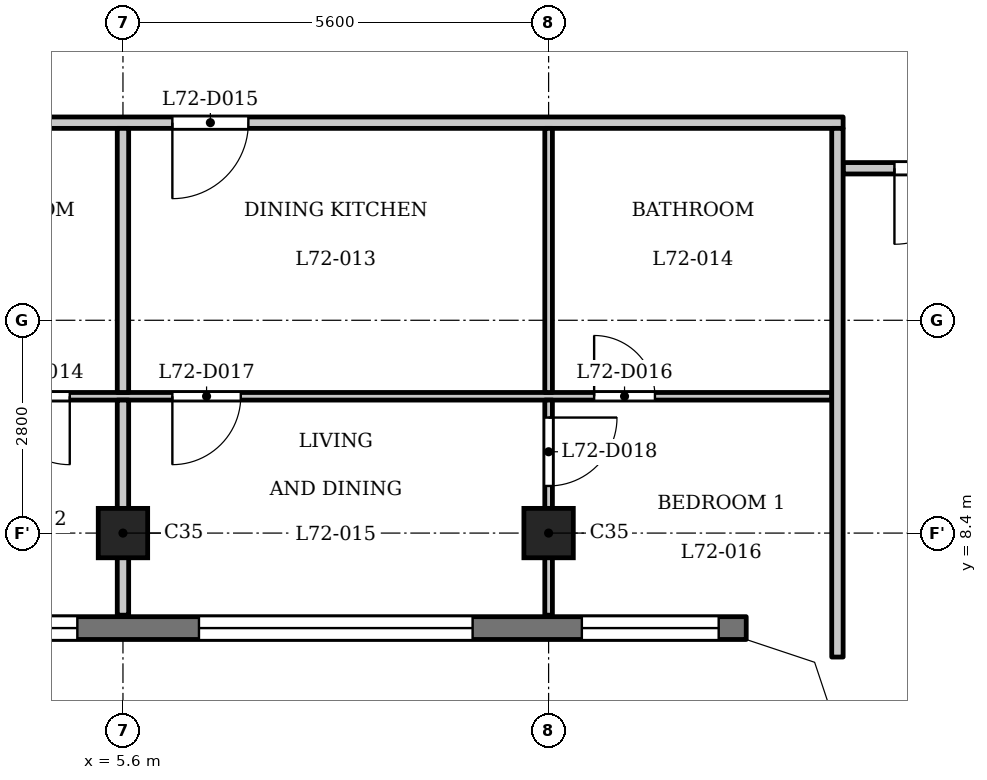
"""IFC4 building model, lengths in metres.
Left out: names, types, materials, properties, quantities, classifications, styles, units other than length and angle.
Written with IfcOpenShell. Run it as: python <this file> out.ifc"""

import sys

from ifc_helpers import new_model, si_unit, direction, frame, frame_2d, origin, origin_2d, place, context, subcontext, project, spatial, polyline, rectangle, outline, extrude, element, fill, save


model = new_model("IFC4")
c1 = context("Model", 3, precision=1e-05, world=origin(), true_north=direction((0.0, 1.0)))
c2 = subcontext(c1, "Body", "Model", "MODEL_VIEW")
j1 = project(units=[si_unit("LENGTHUNIT", "METRE"), si_unit("PLANEANGLEUNIT", "RADIAN")], contexts=[c1])
p1 = place(None, origin())
s1 = spatial("IfcSite", under=j1, at=p1, CompositionType="ELEMENT")
p2 = place(p1, origin())
s2 = spatial("IfcBuilding", under=s1, at=p2, CompositionType="ELEMENT")
p3 = place(p2, frame((0.0, 0.0, 276.7)))
s3 = spatial("IfcBuildingStorey", under=s2, at=p3, CompositionType="ELEMENT", Elevation=276.7)
for number, where, z_axis, x_axis in (
    (1, (5.6, 8.4, 0.0), (0.0, 0.0, 1.0), (1.0, 0.0, 0.0)),
    (2, (11.2, 8.4, 0.0), (0.0, 0.0, 1.0), (1.0, 0.0, 0.0)),
):
    element("IfcColumn", number, at=place(p3, frame(where, z_axis=z_axis, x_axis=x_axis)), inside=s3, PredefinedType="COLUMN", context=c2, shape_type="SweptSolid", body=[
        extrude(rectangle(XDim=0.65, YDim=0.65, at=origin_2d()), origin(), (0.0, 0.0, 1.0), 3.5),
    ])
p4 = place(p3, frame((-13.8, 7.15, 0.0), z_axis=(0.0, 0.0, 1.0), x_axis=(1.0, 0.0, 0.0)))
e3 = element("IfcWall", 3, at=p4, inside=s3, PredefinedType="SOLIDWALL", context=c2, shape_type="SweptSolid", body=[
    extrude(rectangle(XDim=27.6, YDim=0.3, at=frame_2d((13.8, 0.0))), origin(), (0.0, 0.0, 1.0), 3.2),
])
p5 = place(p4, frame((0.363, 0.0, 0.9)))
e4 = element("IfcOpeningElement", 4, at=p5, cuts=e3, PredefinedType="OPENING", context=c2, shape_type="SweptSolid", body=[
    extrude(rectangle(XDim=1.8, YDim=1.25, at=frame_2d((0.9, 0.625))), frame((0.0, 0.16, 0.0), z_axis=(0.0, -1.0, 0.0), x_axis=(1.0, 0.0, 0.0)), (0.0, 0.0, 1.0), 0.32),
])
p6 = place(p4, frame((3.6, 0.0, 1.2)))
e5 = element("IfcOpeningElement", 5, at=p6, cuts=e3, PredefinedType="OPENING", context=c2, shape_type="SweptSolid", body=[
    extrude(rectangle(XDim=3.6, YDim=0.95, at=frame_2d((1.8, 0.475))), frame((0.0, 0.16, 0.0), z_axis=(0.0, -1.0, 0.0), x_axis=(1.0, 0.0, 0.0)), (0.0, 0.0, 1.0), 0.32),
])
p7 = place(p4, frame((9.2, 0.0, 1.2)))
e6 = element("IfcOpeningElement", 6, at=p7, cuts=e3, PredefinedType="OPENING", context=c2, shape_type="SweptSolid", body=[
    extrude(rectangle(XDim=3.6, YDim=0.95, at=frame_2d((1.8, 0.475))), frame((0.0, 0.16, 0.0), z_axis=(0.0, -1.0, 0.0), x_axis=(1.0, 0.0, 0.0)), (0.0, 0.0, 1.0), 0.32),
])
p8 = place(p4, frame((14.2, 0.0, 0.9)))
e7 = element("IfcOpeningElement", 7, at=p8, cuts=e3, PredefinedType="OPENING", context=c2, shape_type="SweptSolid", body=[
    extrude(rectangle(XDim=1.8, YDim=1.25, at=frame_2d((0.9, 0.625))), frame((0.0, 0.16, 0.0), z_axis=(0.0, -1.0, 0.0), x_axis=(1.0, 0.0, 0.0)), (0.0, 0.0, 1.0), 0.32),
])
p9 = place(p4, frame((17.0, 0.0, 0.9)))
e8 = element("IfcOpeningElement", 8, at=p9, cuts=e3, PredefinedType="OPENING", context=c2, shape_type="SweptSolid", body=[
    extrude(rectangle(XDim=1.8, YDim=1.25, at=frame_2d((0.9, 0.625))), frame((0.0, 0.16, 0.0), z_axis=(0.0, -1.0, 0.0), x_axis=(1.0, 0.0, 0.0)), (0.0, 0.0, 1.0), 0.32),
])
p10 = place(p4, frame((20.4, 0.0, 1.2)))
e9 = element("IfcOpeningElement", 9, at=p10, cuts=e3, PredefinedType="OPENING", context=c2, shape_type="SweptSolid", body=[
    extrude(rectangle(XDim=3.6, YDim=0.95, at=frame_2d((1.8, 0.475))), frame((0.0, 0.16, 0.0), z_axis=(0.0, -1.0, 0.0), x_axis=(1.0, 0.0, 0.0)), (0.0, 0.0, 1.0), 0.32),
])
p11 = place(p4, frame((25.438, 0.0, 0.9)))
e10 = element("IfcOpeningElement", 10, at=p11, cuts=e3, PredefinedType="OPENING", context=c2, shape_type="SweptSolid", body=[
    extrude(rectangle(XDim=1.8, YDim=1.25, at=frame_2d((0.9, 0.625))), frame((0.0, 0.16, 0.0), z_axis=(0.0, -1.0, 0.0), x_axis=(1.0, 0.0, 0.0)), (0.0, 0.0, 1.0), 0.32),
])
p12 = place(p3, frame((-14.925, 10.2, 0.0), z_axis=(0.0, 0.0, 1.0), x_axis=(1.0, 0.0, 0.0)))
e11 = element("IfcWall", 11, at=p12, inside=s3, PredefinedType="PARTITIONING", context=c2, shape_type="SweptSolid", body=[
    extrude(rectangle(XDim=29.85, YDim=0.1, at=frame_2d((14.925, 0.0))), origin(), (0.0, 0.0, 1.0), 3.2),
])
p13 = place(p12, frame((4.375, 0.0, 0.0)))
e12 = element("IfcOpeningElement", 12, at=p13, cuts=e11, PredefinedType="OPENING", context=c2, shape_type="SweptSolid", body=[
    extrude(rectangle(XDim=0.8, YDim=2.1, at=frame_2d((0.4, 1.05))), frame((0.0, 0.06, 0.0), z_axis=(0.0, -1.0, 0.0), x_axis=(1.0, 0.0, 0.0)), (0.0, 0.0, 1.0), 0.12),
])
p14 = place(p12, frame((0.576, 0.0, 0.0)))
e13 = element("IfcOpeningElement", 13, at=p14, cuts=e11, PredefinedType="OPENING", context=c2, shape_type="SweptSolid", body=[
    extrude(rectangle(XDim=0.9, YDim=2.1, at=frame_2d((0.45, 1.05))), frame((0.0, 0.06, 0.0), z_axis=(0.0, -1.0, 0.0), x_axis=(1.0, 0.0, 0.0)), (0.0, 0.0, 1.0), 0.12),
])
p15 = place(p12, frame((10.875, 0.0, 0.0)))
e14 = element("IfcOpeningElement", 14, at=p15, cuts=e11, PredefinedType="OPENING", context=c2, shape_type="SweptSolid", body=[
    extrude(rectangle(XDim=0.8, YDim=2.1, at=frame_2d((0.4, 1.05))), frame((0.0, 0.06, 0.0), z_axis=(0.0, -1.0, 0.0), x_axis=(1.0, 0.0, 0.0)), (0.0, 0.0, 1.0), 0.12),
])
p16 = place(p12, frame((12.725, 0.0, 0.0)))
e15 = element("IfcOpeningElement", 15, at=p16, cuts=e11, PredefinedType="OPENING", context=c2, shape_type="SweptSolid", body=[
    extrude(rectangle(XDim=0.9, YDim=2.1, at=frame_2d((0.45, 1.05))), frame((0.0, 0.06, 0.0), z_axis=(0.0, -1.0, 0.0), x_axis=(1.0, 0.0, 0.0)), (0.0, 0.0, 1.0), 0.12),
])
p17 = place(p12, frame((16.075, 0.0, 0.0)))
e16 = element("IfcOpeningElement", 16, at=p17, cuts=e11, PredefinedType="OPENING", context=c2, shape_type="SweptSolid", body=[
    extrude(rectangle(XDim=0.9, YDim=2.1, at=frame_2d((0.45, 1.05))), frame((0.0, 0.06, 0.0), z_axis=(0.0, -1.0, 0.0), x_axis=(1.0, 0.0, 0.0)), (0.0, 0.0, 1.0), 0.12),
])
p18 = place(p12, frame((18.925, 0.0, 0.0)))
e17 = element("IfcOpeningElement", 17, at=p18, cuts=e11, PredefinedType="OPENING", context=c2, shape_type="SweptSolid", body=[
    extrude(rectangle(XDim=0.9, YDim=2.1, at=frame_2d((0.45, 1.05))), frame((0.0, 0.06, 0.0), z_axis=(0.0, -1.0, 0.0), x_axis=(1.0, 0.0, 0.0)), (0.0, 0.0, 1.0), 0.12),
])
p19 = place(p12, frame((26.724, 0.0, 0.0)))
e18 = element("IfcOpeningElement", 18, at=p19, cuts=e11, PredefinedType="OPENING", context=c2, shape_type="SweptSolid", body=[
    extrude(rectangle(XDim=0.8, YDim=2.1, at=frame_2d((0.4, 1.05))), frame((0.0, 0.06, 0.0), z_axis=(0.0, -1.0, 0.0), x_axis=(1.0, 0.0, 0.0)), (0.0, 0.0, 1.0), 0.12),
])
p20 = place(p12, frame((21.175, 0.0, 0.0)))
e19 = element("IfcOpeningElement", 19, at=p20, cuts=e11, PredefinedType="OPENING", context=c2, shape_type="SweptSolid", body=[
    extrude(rectangle(XDim=0.9, YDim=2.1, at=frame_2d((0.45, 1.05))), frame((0.0, 0.06, 0.0), z_axis=(0.0, -1.0, 0.0), x_axis=(1.0, 0.0, 0.0)), (0.0, 0.0, 1.0), 0.12),
])
p21 = place(p3, frame((15.075, 13.2, 0.0), z_axis=(0.0, 0.0, 1.0), x_axis=(1.0, 0.0, 0.0)))
e20 = element("IfcWall", 20, at=p21, inside=s3, PredefinedType="PARTITIONING", context=c2, shape_type="SweptSolid", body=[
    extrude(rectangle(XDim=2.325, YDim=0.15, at=frame_2d((1.163, 0.0))), origin(), (0.0, 0.0, 1.0), 3.2),
])
p22 = place(p21, frame((0.675, 0.0, 0.0)))
e21 = element("IfcOpeningElement", 21, at=p22, cuts=e20, PredefinedType="OPENING", context=c2, shape_type="SweptSolid", body=[
    extrude(rectangle(XDim=1.0, YDim=2.1, at=frame_2d((0.5, 1.05))), frame((0.0, 0.085, 0.0), z_axis=(0.0, -1.0, 0.0), x_axis=(1.0, 0.0, 0.0)), (0.0, 0.0, 1.0), 0.17),
])
p23 = place(p3, frame((-15.075, 13.8, 0.0), z_axis=(0.0, 0.0, 1.0), x_axis=(1.0, 0.0, 0.0)))
e22 = element("IfcWall", 22, at=p23, inside=s3, PredefinedType="PARTITIONING", context=c2, shape_type="SweptSolid", body=[
    extrude(rectangle(XDim=30.15, YDim=0.15, at=frame_2d((15.075, 0.0))), origin(), (0.0, 0.0, 1.0), 3.2),
])
p24 = place(p23, frame((0.726, 0.0, 0.0)))
e23 = element("IfcOpeningElement", 23, at=p24, cuts=e22, PredefinedType="OPENING", context=c2, shape_type="SweptSolid", body=[
    extrude(rectangle(XDim=1.0, YDim=2.1, at=frame_2d((0.5, 1.05))), frame((0.0, 0.085, 0.0), z_axis=(0.0, -1.0, 0.0), x_axis=(1.0, 0.0, 0.0)), (0.0, 0.0, 1.0), 0.17),
])
p25 = place(p23, frame((15.725, 0.0, 0.0)))
e24 = element("IfcOpeningElement", 24, at=p25, cuts=e22, PredefinedType="OPENING", context=c2, shape_type="SweptSolid", body=[
    extrude(rectangle(XDim=1.0, YDim=2.1, at=frame_2d((0.5, 1.05))), frame((0.0, 0.085, 0.0), z_axis=(0.0, -1.0, 0.0), x_axis=(1.0, 0.0, 0.0)), (0.0, 0.0, 1.0), 0.17),
])
p26 = place(p23, frame((21.325, 0.0, 0.0)))
e25 = element("IfcOpeningElement", 25, at=p26, cuts=e22, PredefinedType="OPENING", context=c2, shape_type="SweptSolid", body=[
    extrude(rectangle(XDim=1.0, YDim=2.1, at=frame_2d((0.5, 1.05))), frame((0.0, 0.085, 0.0), z_axis=(0.0, -1.0, 0.0), x_axis=(1.0, 0.0, 0.0)), (0.0, 0.0, 1.0), 0.17),
])
p27 = place(p3, frame((5.6, 7.32, 0.0), z_axis=(0.0, 0.0, 1.0), x_axis=(0.0, 1.0, 0.0)))
e26 = element("IfcWall", 26, at=p27, inside=s3, PredefinedType="PARTITIONING", context=c2, shape_type="SweptSolid", body=[
    extrude(rectangle(XDim=2.83, YDim=0.15, at=frame_2d((1.415, 0.0))), origin(), (0.0, 0.0, 1.0), 3.2),
])
p28 = place(p3, frame((5.6, 10.25, 0.0), z_axis=(0.0, 0.0, 1.0), x_axis=(0.0, 1.0, 0.0)))
e27 = element("IfcWall", 27, at=p28, inside=s3, PredefinedType="PARTITIONING", context=c2, shape_type="SweptSolid", body=[
    extrude(rectangle(XDim=3.475, YDim=0.15, at=frame_2d((1.738, 0.0))), origin(), (0.0, 0.0, 1.0), 3.2),
])
p29 = place(p3, frame((11.2, 7.32, 0.0), z_axis=(0.0, 0.0, 1.0), x_axis=(0.0, 1.0, 0.0)))
e28 = element("IfcWall", 28, at=p29, inside=s3, PredefinedType="PARTITIONING", context=c2, shape_type="SweptSolid", body=[
    extrude(rectangle(XDim=2.83, YDim=0.1, at=frame_2d((1.415, 0.0))), origin(), (0.0, 0.0, 1.0), 3.2),
])
p30 = place(p29, frame((1.7, 0.0, 0.0)))
e29 = element("IfcOpeningElement", 29, at=p30, cuts=e28, PredefinedType="OPENING", context=c2, shape_type="SweptSolid", body=[
    extrude(rectangle(XDim=0.9, YDim=2.1, at=frame_2d((0.45, 1.05))), frame((0.0, 0.06, 0.0), z_axis=(0.0, -1.0, 0.0), x_axis=(1.0, 0.0, 0.0)), (0.0, 0.0, 1.0), 0.12),
])
p31 = place(p3, frame((11.2, 10.25, 0.0), z_axis=(0.0, 0.0, 1.0), x_axis=(0.0, 1.0, 0.0)))
e30 = element("IfcWall", 30, at=p31, inside=s3, PredefinedType="PARTITIONING", context=c2, shape_type="SweptSolid", body=[
    extrude(rectangle(XDim=3.475, YDim=0.1, at=frame_2d((1.738, 0.0))), origin(), (0.0, 0.0, 1.0), 3.2),
])
p32 = place(p3, frame((15.0, 6.769, 0.0), z_axis=(0.0, 0.0, 1.0), x_axis=(0.0, 1.0, 0.0)))
e31 = element("IfcWall", 31, at=p32, inside=s3, PredefinedType="PARTITIONING", context=c2, shape_type="SweptSolid", body=[
    extrude(rectangle(XDim=6.956, YDim=0.15, at=frame_2d((3.478, 0.0))), origin(), (0.0, 0.0, 1.0), 3.2),
])
p33 = place(p3, origin())
e32 = element("IfcWall", 32, at=p33, inside=s3, PredefinedType="SOLIDWALL", context=c2, shape_type="SweptSolid", body=[
    extrude(outline(polyline([(14.937, 6.937), (13.849, 7.3), (13.8, 7.3), (13.8, 7.0), (14.7, 6.7), (15.0, 5.8), (15.3, 5.8), (15.3, 5.849), (14.937, 6.937)])), origin(), (0.0, 0.0, 1.0), 3.2),
])
p34 = place(p22, origin())
e33 = element("IfcDoor", 33, at=p34, inside=s3, OperationType="SINGLE_SWING_LEFT", PredefinedType="DOOR", context=c2, shape_type="SweptSolid", body=[
    extrude(rectangle(XDim=1.0, YDim=2.1, at=frame_2d((0.5, 1.05))), frame((0.0, 0.025, 0.0), z_axis=(0.0, -1.0, 0.0), x_axis=(1.0, 0.0, 0.0)), (0.0, 0.0, 1.0), 0.05),
])
fill(e21, e33)
p35 = place(p18, origin())
e34 = element("IfcDoor", 34, at=p35, inside=s3, OperationType="SINGLE_SWING_RIGHT", PredefinedType="DOOR", context=c2, shape_type="SweptSolid", body=[
    extrude(rectangle(XDim=0.9, YDim=2.1, at=frame_2d((0.45, 1.05))), frame((0.0, 0.025, 0.0), z_axis=(0.0, -1.0, 0.0), x_axis=(1.0, 0.0, 0.0)), (0.0, 0.0, 1.0), 0.05),
])
fill(e17, e34)
p36 = place(p26, origin())
e35 = element("IfcDoor", 35, at=p36, inside=s3, OperationType="SINGLE_SWING_LEFT", PredefinedType="DOOR", context=c2, shape_type="SweptSolid", body=[
    extrude(rectangle(XDim=1.0, YDim=2.1, at=frame_2d((0.5, 1.05))), frame((0.0, 0.025, 0.0), z_axis=(0.0, -1.0, 0.0), x_axis=(1.0, 0.0, 0.0)), (0.0, 0.0, 1.0), 0.05),
])
fill(e25, e35)
p37 = place(p19, origin())
e36 = element("IfcDoor", 36, at=p37, inside=s3, OperationType="SINGLE_SWING_RIGHT", PredefinedType="DOOR", context=c2, shape_type="SweptSolid", body=[
    extrude(rectangle(XDim=0.8, YDim=2.1, at=frame_2d((0.4, 1.05))), frame((0.0, 0.025, 0.0), z_axis=(0.0, -1.0, 0.0), x_axis=(1.0, 0.0, 0.0)), (0.0, 0.0, 1.0), 0.05),
])
fill(e18, e36)
p38 = place(p20, origin())
e37 = element("IfcDoor", 37, at=p38, inside=s3, OperationType="SINGLE_SWING_LEFT", PredefinedType="DOOR", context=c2, shape_type="SweptSolid", body=[
    extrude(rectangle(XDim=0.9, YDim=2.1, at=frame_2d((0.45, 1.05))), frame((0.0, 0.025, 0.0), z_axis=(0.0, -1.0, 0.0), x_axis=(1.0, 0.0, 0.0)), (0.0, 0.0, 1.0), 0.05),
])
fill(e19, e37)
p39 = place(p30, origin())
e38 = element("IfcDoor", 38, at=p39, inside=s3, OperationType="SINGLE_SWING_RIGHT", PredefinedType="DOOR", context=c2, shape_type="SweptSolid", body=[
    extrude(rectangle(XDim=0.9, YDim=2.1, at=frame_2d((0.45, 1.05))), frame((0.0, 0.025, 0.0), z_axis=(0.0, -1.0, 0.0), x_axis=(1.0, 0.0, 0.0)), (0.0, 0.0, 1.0), 0.05),
])
fill(e29, e38)
p40 = place(p9, origin())
e39 = element("IfcWindow", 39, at=p40, inside=s3, PartitioningType="SINGLE_PANEL", PredefinedType="WINDOW", context=c2, shape_type="SweptSolid", body=[
    extrude(rectangle(XDim=1.8, YDim=1.25, at=frame_2d((0.9, 0.625))), frame((0.0, 0.03, 0.0), z_axis=(0.0, -1.0, 0.0), x_axis=(1.0, 0.0, 0.0)), (0.0, 0.0, 1.0), 0.06),
])
fill(e8, e39)
p41 = place(p10, origin())
e40 = element("IfcWindow", 40, at=p41, inside=s3, PartitioningType="SINGLE_PANEL", PredefinedType="WINDOW", context=c2, shape_type="SweptSolid", body=[
    extrude(rectangle(XDim=3.6, YDim=0.95, at=frame_2d((1.8, 0.475))), frame((0.0, 0.03, 0.0), z_axis=(0.0, -1.0, 0.0), x_axis=(1.0, 0.0, 0.0)), (0.0, 0.0, 1.0), 0.06),
])
fill(e9, e40)
p42 = place(p11, origin())
e41 = element("IfcWindow", 41, at=p42, inside=s3, PartitioningType="SINGLE_PANEL", PredefinedType="WINDOW", context=c2, shape_type="SweptSolid", body=[
    extrude(rectangle(XDim=1.8, YDim=1.25, at=frame_2d((0.9, 0.625))), frame((0.0, 0.03, 0.0), z_axis=(0.0, -1.0, 0.0), x_axis=(1.0, 0.0, 0.0)), (0.0, 0.0, 1.0), 0.06),
])
fill(e10, e41)
save(model, sys.argv[1])
